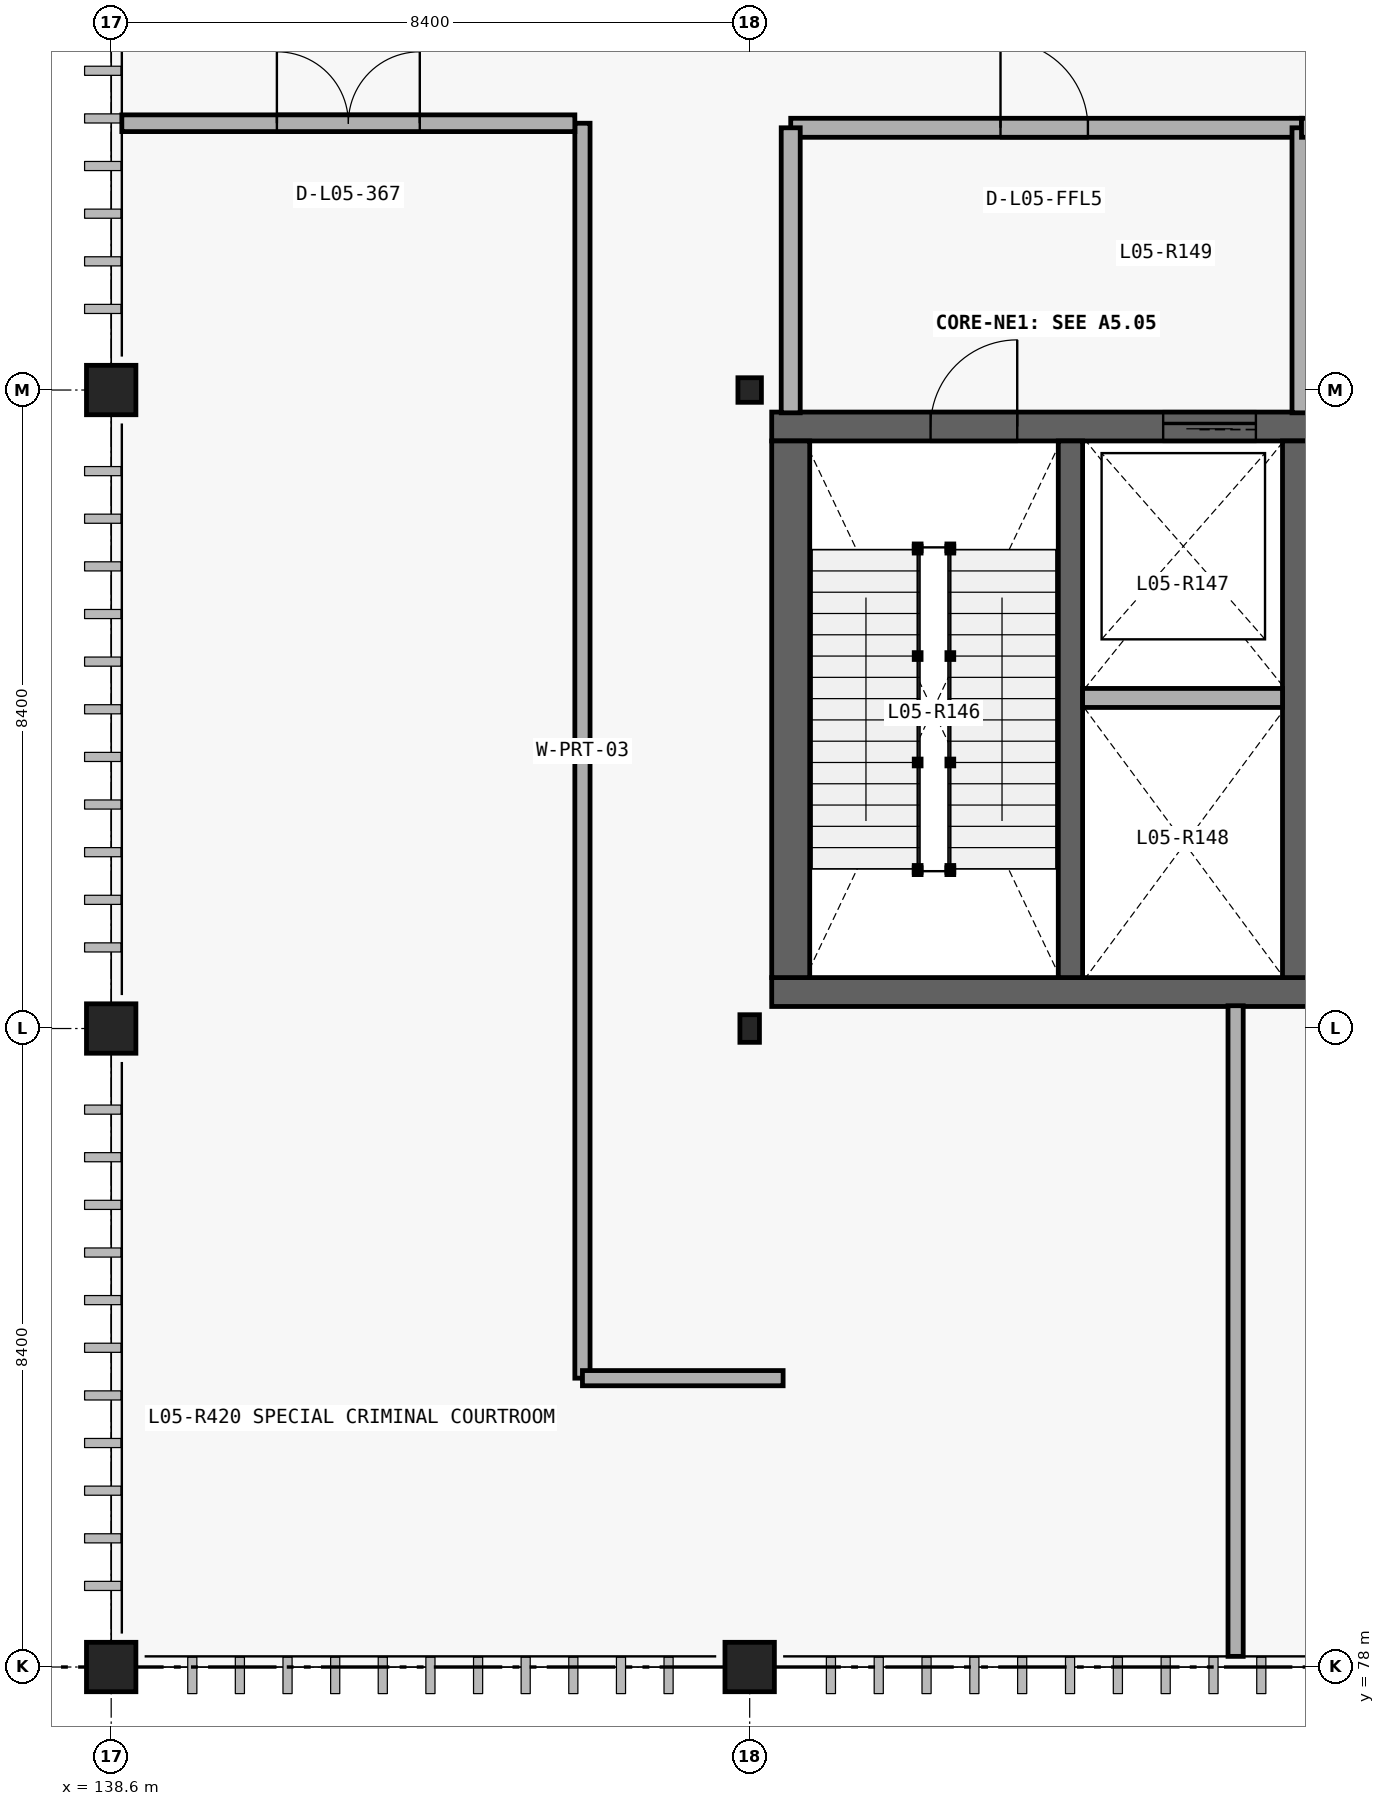
"""IFC4 building model, lengths in metres.
Left out: names, types, materials, properties, quantities, classifications, styles, units other than length and angle.
Written with IfcOpenShell. Run it as: python <this file> out.ifc"""

import sys

from ifc_helpers import new_model, si_unit, direction, frame, frame_2d, origin_with_axes, origin_2d_with_axis, place, context, subcontext, project, spatial, rectangle, circle, i_section, extrude, element, fill, save


model = new_model("IFC4")
c1 = context("Model", 3, precision=1e-05, world=origin_with_axes(), true_north=direction((0.0, 1.0)))
c2 = subcontext(c1, "Body", "Model", "MODEL_VIEW")
j1 = project(units=[si_unit("LENGTHUNIT", "METRE"), si_unit("PLANEANGLEUNIT", "RADIAN")], contexts=[c1])
p1 = place(None, origin_with_axes())
s1 = spatial("IfcSite", under=j1, at=p1, CompositionType="ELEMENT")
p2 = place(p1, origin_with_axes())
s2 = spatial("IfcBuilding", under=s1, at=p2, CompositionType="ELEMENT")
p3 = place(p2, frame((0.0, 0.0, 24.9), z_axis=(0.0, 0.0, 1.0), x_axis=(1.0, 0.0, 0.0)))
s3 = spatial("IfcBuildingStorey", under=s2, at=p3, CompositionType="ELEMENT", Elevation=24.9)
p4 = place(None, frame((147.29, 86.88, 24.9), z_axis=(0.0, 0.0, 1.0), x_axis=(1.0, 0.0, 0.0)))
e1 = element("IfcWall", 1, at=p4, inside=s3, PredefinedType="SHEAR", context=c2, shape_type="SweptSolid", body=[
    extrude(rectangle(XDim=7.22, YDim=0.38, at=frame_2d((3.61, 0.0), x_axis=(1.0, 0.0))), origin_with_axes(), (0.0, 0.0, 1.0), 4.8),
])
p5 = place(None, frame((154.51, 94.32, 24.9), z_axis=(0.0, 0.0, 1.0), x_axis=(-1.0, 0.0, 0.0)))
e2 = element("IfcWall", 2, at=p5, inside=s3, PredefinedType="SHEAR", context=c2, shape_type="SweptSolid", body=[
    extrude(rectangle(XDim=7.22, YDim=0.38, at=frame_2d((3.61, 0.0), x_axis=(1.0, 0.0))), origin_with_axes(), (0.0, 0.0, 1.0), 4.8),
])
p6 = place(None, frame((149.95, 94.32, 24.9), z_axis=(0.0, 0.0, 1.0), x_axis=(-1.0, 0.0, 0.0)))
e3 = element("IfcOpeningElement", 3, at=p6, cuts=e2, PredefinedType="OPENING", context=c2, shape_type="SweptSolid", body=[
    extrude(rectangle(XDim=1.14, YDim=2.18, at=frame_2d((0.0, 1.09), x_axis=(1.0, 0.0))), frame((0.0, 0.2, 0.0), z_axis=(0.0, -1.0, 0.0), x_axis=(1.0, 0.0, 0.0)), (0.0, 0.0, 1.0), 0.4),
])
p7 = place(None, frame((153.05, 94.32, 24.9), z_axis=(0.0, 0.0, 1.0), x_axis=(-1.0, 0.0, 0.0)))
e4 = element("IfcOpeningElement", 4, at=p7, cuts=e2, PredefinedType="OPENING", context=c2, shape_type="SweptSolid", body=[
    extrude(rectangle(XDim=1.22, YDim=2.28, at=frame_2d((0.0, 1.14), x_axis=(1.0, 0.0))), frame((0.0, 0.2, 0.0), z_axis=(0.0, -1.0, 0.0), x_axis=(1.0, 0.0, 0.0)), (0.0, 0.0, 1.0), 0.4),
])
for number, where, z_axis, x_axis in (
    (5, (154.26, 87.07, 24.9), (0.0, 0.0, 1.0), (0.0, 1.0, 0.0)),
    (6, (147.54, 94.13, 24.9), (0.0, 0.0, 1.0), (0.0, -1.0, 0.0)),
):
    element("IfcWall", number, at=place(None, frame(where, z_axis=z_axis, x_axis=x_axis)), inside=s3, PredefinedType="SHEAR", context=c2, shape_type="SweptSolid", body=[
        extrude(rectangle(XDim=7.06, YDim=0.5, at=frame_2d((3.53, 0.0), x_axis=(1.0, 0.0))), origin_with_axes(), (0.0, 0.0, 1.0), 4.8),
    ])
p8 = place(None, frame((151.22, 87.07, 24.9), z_axis=(0.0, 0.0, 1.0), x_axis=(0.0, 1.0, 0.0)))
e7 = element("IfcWall", 7, at=p8, inside=s3, PredefinedType="SHEAR", context=c2, shape_type="SweptSolid", body=[
    extrude(rectangle(XDim=7.06, YDim=0.32, at=frame_2d((3.53, 0.0), x_axis=(1.0, 0.0))), origin_with_axes(), (0.0, 0.0, 1.0), 4.8),
])
p9 = place(None, frame((151.38, 90.749, 24.9), z_axis=(0.0, 0.0, 1.0), x_axis=(1.0, 0.0, 0.0)))
e8 = element("IfcWall", 8, at=p9, inside=s3, PredefinedType="PARTITIONING", context=c2, shape_type="SweptSolid", body=[
    extrude(rectangle(XDim=2.63, YDim=0.25, at=frame_2d((1.315, 0.0), x_axis=(1.0, 0.0))), origin_with_axes(), (0.0, 0.0, 1.0), 4.44),
])
p10 = place(None, frame((154.26, 98.25, 24.9), z_axis=(0.0, 0.0, 1.0), x_axis=(-1.0, 0.0, 0.0)))
e9 = element("IfcWall", 9, at=p10, inside=s3, PredefinedType="PARTITIONING", context=c2, shape_type="SweptSolid", body=[
    extrude(rectangle(XDim=6.72, YDim=0.25, at=frame_2d((3.36, 0.0), x_axis=(1.0, 0.0))), origin_with_axes(), (0.0, 0.0, 1.0), 4.44),
])
p11 = place(None, frame((150.875, 98.25, 24.9), z_axis=(0.0, 0.0, 1.0), x_axis=(-1.0, 0.0, 0.0)))
e10 = element("IfcOpeningElement", 10, at=p11, cuts=e9, PredefinedType="OPENING", context=c2, shape_type="SweptSolid", body=[
    extrude(rectangle(XDim=1.15, YDim=2.25, at=frame_2d((0.0, 1.125), x_axis=(1.0, 0.0))), frame((0.0, 0.135, 0.0), z_axis=(0.0, -1.0, 0.0), x_axis=(1.0, 0.0, 0.0)), (0.0, 0.0, 1.0), 0.27),
])
for number, where, z_axis, x_axis in (
    (11, (147.54, 94.5, 24.9), (0.0, 0.0, 1.0), (0.0, 1.0, 0.0)),
    (12, (154.26, 94.5, 24.9), (0.0, 0.0, 1.0), (0.0, 1.0, 0.0)),
):
    element("IfcWall", number, at=place(None, frame(where, z_axis=z_axis, x_axis=x_axis)), inside=s3, PredefinedType="PARTITIONING", context=c2, shape_type="SweptSolid", body=[
        extrude(rectangle(XDim=3.75, YDim=0.25, at=frame_2d((1.875, 0.0), x_axis=(1.0, 0.0))), origin_with_axes(), (0.0, 0.0, 1.0), 4.44),
    ])
p12 = place(None, frame((154.26, 98.25, 24.9), z_axis=(0.0, 0.0, 1.0), x_axis=(1.0, 0.0, 0.0)))
e13 = element("IfcWall", 13, at=p12, inside=s3, PredefinedType="PARTITIONING", context=c2, shape_type="SweptSolid", body=[
    extrude(rectangle(XDim=1.08, YDim=0.25, at=frame_2d((0.54, 0.0), x_axis=(1.0, 0.0))), origin_with_axes(), (0.0, 0.0, 1.0), 4.44),
])
p13 = place(None, frame((144.8, 81.8, 24.9), z_axis=(0.0, 0.0, 1.0), x_axis=(0.0, 1.0, 0.0)))
e14 = element("IfcWall", 14, at=p13, inside=s3, PredefinedType="PARTITIONING", context=c2, shape_type="SweptSolid", body=[
    extrude(rectangle(XDim=16.51, YDim=0.2, at=frame_2d((8.255, 0.0), x_axis=(1.0, 0.0))), origin_with_axes(), (0.0, 0.0, 1.0), 4.44),
])
p14 = place(None, frame((144.8, 81.8, 24.9), z_axis=(0.0, 0.0, 1.0), x_axis=(1.0, 0.0, 0.0)))
e15 = element("IfcWall", 15, at=p14, inside=s3, PredefinedType="PARTITIONING", context=c2, shape_type="SweptSolid", body=[
    extrude(rectangle(XDim=2.64, YDim=0.2, at=frame_2d((1.32, 0.0), x_axis=(1.0, 0.0))), origin_with_axes(), (0.0, 0.0, 1.0), 4.44),
])
p15 = place(None, frame((138.74, 98.31, 24.9), z_axis=(0.0, 0.0, 1.0), x_axis=(1.0, 0.0, 0.0)))
e16 = element("IfcWall", 16, at=p15, inside=s3, PredefinedType="PARTITIONING", context=c2, shape_type="SweptSolid", body=[
    extrude(rectangle(XDim=5.96, YDim=0.22, at=frame_2d((2.98, 0.0), x_axis=(1.0, 0.0))), origin_with_axes(), (0.0, 0.0, 1.0), 4.44),
])
p16 = place(None, frame((141.72, 98.31, 24.9), z_axis=(0.0, 0.0, 1.0), x_axis=(1.0, 0.0, 0.0)))
e17 = element("IfcOpeningElement", 17, at=p16, cuts=e16, PredefinedType="OPENING", context=c2, shape_type="SweptSolid", body=[
    extrude(rectangle(XDim=1.88, YDim=2.56, at=frame_2d((0.0, 1.28), x_axis=(1.0, 0.0))), frame((0.0, 0.12, 0.0), z_axis=(0.0, -1.0, 0.0), x_axis=(1.0, 0.0, 0.0)), (0.0, 0.0, 1.0), 0.24),
])
p17 = place(None, frame((153.393, 78.14, 24.9), z_axis=(0.0, 0.0, 1.0), x_axis=(0.0, 1.0, 0.0)))
e18 = element("IfcWall", 18, at=p17, inside=s3, PredefinedType="PARTITIONING", context=c2, shape_type="SweptSolid", body=[
    extrude(rectangle(XDim=8.56, YDim=0.2, at=frame_2d((4.28, 0.0), x_axis=(1.0, 0.0))), origin_with_axes(), (0.0, 0.0, 1.0), 4.44),
])
for number, where, z_axis, x_axis in (
    (19, (138.6, 78.0, 24.9), (0.0, 0.0, 1.0), (1.0, 0.0, 0.0)),
    (20, (138.6, 86.4, 24.9), (0.0, 0.0, 1.0), (1.0, 0.0, 0.0)),
    (21, (138.6, 94.8, 24.9), (0.0, 0.0, 1.0), (1.0, 0.0, 0.0)),
    (22, (147.0, 78.0, 24.9), (0.0, 0.0, 1.0), (1.0, 0.0, 0.0)),
):
    element("IfcColumn", number, at=place(None, frame(where, z_axis=z_axis, x_axis=x_axis)), inside=s3, PredefinedType="COLUMN", context=c2, shape_type="SweptSolid", body=[
        extrude(circle(Radius=0.325, at=origin_2d_with_axis()), origin_with_axes(), (0.0, 0.0, 1.0), 4.8),
    ])
p18 = place(None, frame((147.0, 86.4, 24.9), z_axis=(0.0, 0.0, 1.0), x_axis=(1.0, 0.0, 0.0)))
e23 = element("IfcColumn", 23, at=p18, inside=s3, PredefinedType="COLUMN", context=c2, shape_type="SweptSolid", body=[
    extrude(i_section(OverallWidth=0.257, OverallDepth=0.363, WebThickness=0.013, FlangeThickness=0.022, at=origin_2d_with_axis()), origin_with_axes(), (0.0, 0.0, 1.0), 4.8),
])
p19 = place(None, frame((147.0, 94.8, 24.9), z_axis=(0.0, 0.0, 1.0), x_axis=(1.0, 0.0, 0.0)))
e24 = element("IfcColumn", 24, at=p19, inside=s3, PredefinedType="COLUMN", context=c2, shape_type="SweptSolid", body=[
    extrude(i_section(OverallWidth=0.309, OverallDepth=0.323, WebThickness=0.014, FlangeThickness=0.023, at=origin_2d_with_axis()), origin_with_axes(), (0.0, 0.0, 1.0), 4.8),
])
p20 = place(None, frame((149.95, 94.32, 24.9), z_axis=(0.0, 0.0, 1.0), x_axis=(1.0, 0.0, 0.0)))
e25 = element("IfcDoor", 25, at=p20, inside=s3, OperationType="SINGLE_SWING_LEFT", PredefinedType="DOOR", context=c2, shape_type="SweptSolid", body=[
    extrude(rectangle(XDim=1.14, YDim=2.18, at=frame_2d((0.0, 1.09), x_axis=(1.0, 0.0))), frame((0.0, 0.04, 0.0), z_axis=(0.0, -1.0, 0.0), x_axis=(1.0, 0.0, 0.0)), (0.0, 0.0, 1.0), 0.08),
])
fill(e3, e25)
p21 = place(None, frame((153.05, 94.32, 24.9), z_axis=(0.0, 0.0, 1.0), x_axis=(1.0, 0.0, 0.0)))
e26 = element("IfcDoor", 26, at=p21, inside=s3, OperationType="SLIDING_TO_LEFT", PredefinedType="DOOR", context=c2, shape_type="SweptSolid", body=[
    extrude(rectangle(XDim=1.22, YDim=2.28, at=frame_2d((0.0, 1.14), x_axis=(1.0, 0.0))), frame((0.0, 0.04, 0.0), z_axis=(0.0, -1.0, 0.0), x_axis=(1.0, 0.0, 0.0)), (0.0, 0.0, 1.0), 0.08),
])
fill(e4, e26)
p22 = place(None, frame((150.875, 98.25, 24.9), z_axis=(0.0, 0.0, 1.0), x_axis=(1.0, 0.0, 0.0)))
e27 = element("IfcDoor", 27, at=p22, inside=s3, OperationType="SINGLE_SWING_RIGHT", PredefinedType="DOOR", context=c2, shape_type="SweptSolid", body=[
    extrude(rectangle(XDim=1.15, YDim=2.25, at=frame_2d((0.0, 1.125), x_axis=(1.0, 0.0))), frame((0.0, 0.04, 0.0), z_axis=(0.0, -1.0, 0.0), x_axis=(1.0, 0.0, 0.0)), (0.0, 0.0, 1.0), 0.08),
])
fill(e10, e27)
p23 = place(None, frame((141.72, 98.31, 24.9), z_axis=(0.0, 0.0, 1.0), x_axis=(1.0, 0.0, 0.0)))
e28 = element("IfcDoor", 28, at=p23, inside=s3, OperationType="DOUBLE_DOOR_SINGLE_SWING", PredefinedType="DOOR", context=c2, shape_type="SweptSolid", body=[
    extrude(rectangle(XDim=1.88, YDim=2.56, at=frame_2d((0.0, 1.28), x_axis=(1.0, 0.0))), frame((0.0, 0.04, 0.0), z_axis=(0.0, -1.0, 0.0), x_axis=(1.0, 0.0, 0.0)), (0.0, 0.0, 1.0), 0.08),
])
fill(e17, e28)
save(model, sys.argv[1])
